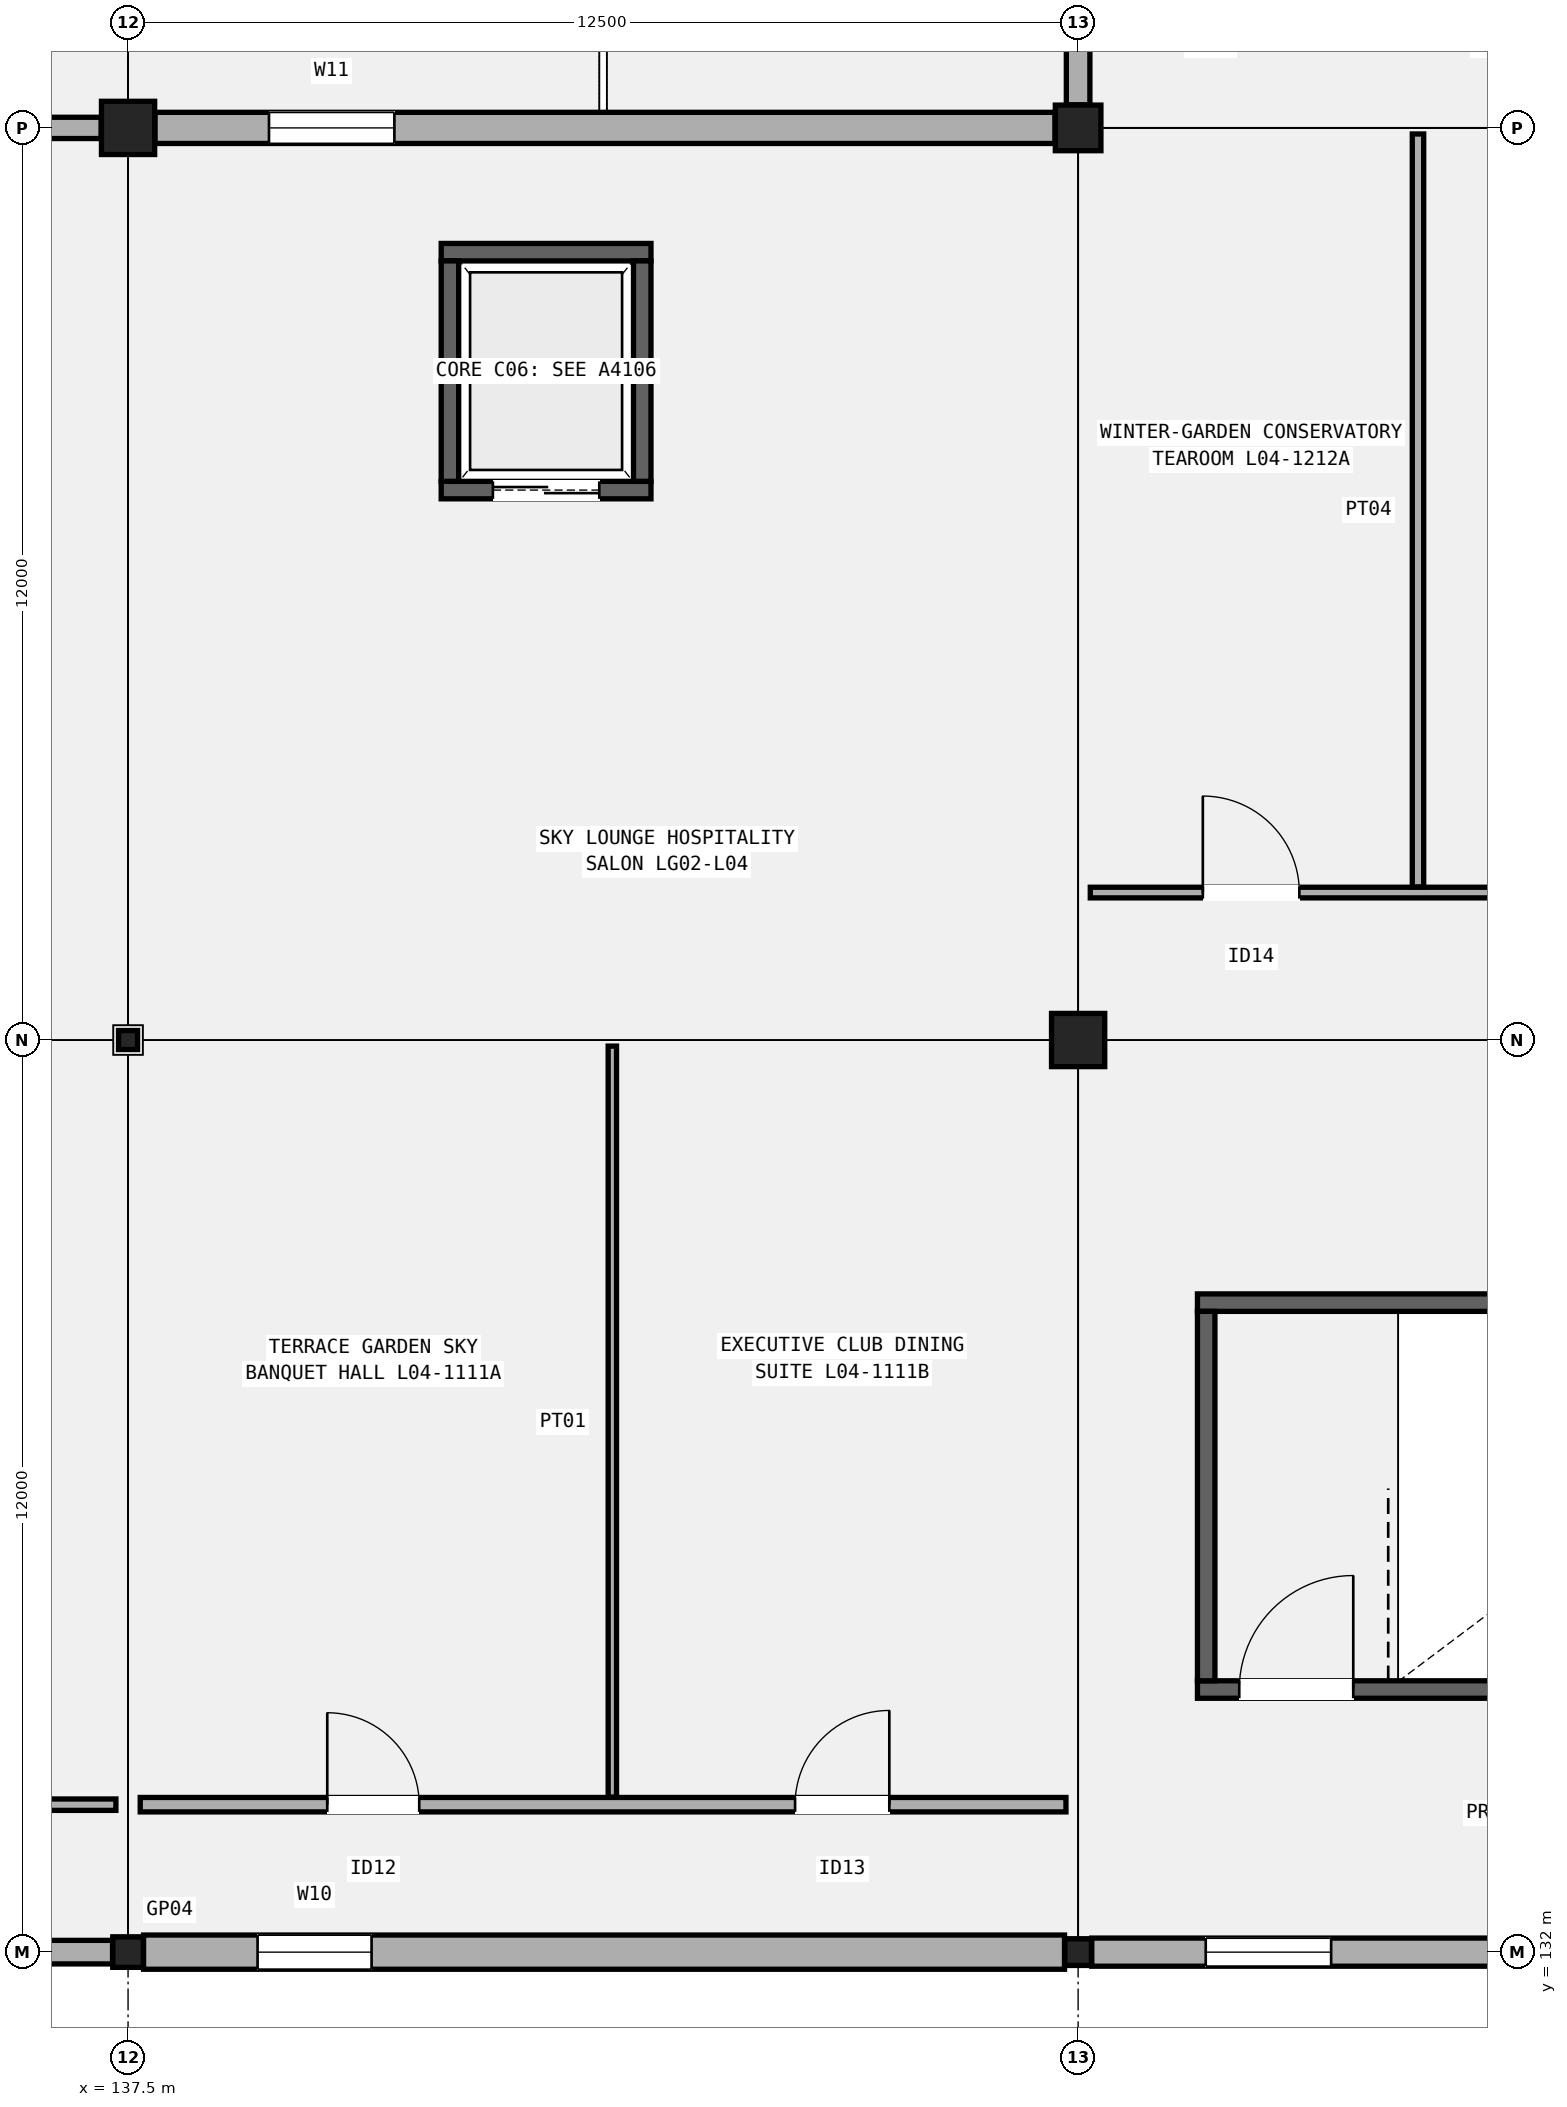
"""IFC4 building model, lengths in metres.
Left out: names, types, materials, properties, quantities, classifications, styles, units other than length and angle.
Written with IfcOpenShell. Run it as: python <this file> out.ifc"""

import sys

from ifc_helpers import new_model, si_unit, direction, frame, frame_2d, origin, origin_2d, place, context, subcontext, project, spatial, rectangle, hollow_rectangle, extrude, element, fill, save


model = new_model("IFC4")
c1 = context("Model", 3, precision=1e-05, world=origin(), true_north=direction((0.0, 1.0)))
c2 = subcontext(c1, "Body", "Model", "MODEL_VIEW")
j1 = project(units=[si_unit("LENGTHUNIT", "METRE"), si_unit("PLANEANGLEUNIT", "RADIAN")], contexts=[c1])
p1 = place(None, origin())
s1 = spatial("IfcSite", under=j1, at=p1, CompositionType="ELEMENT")
p2 = place(p1, origin())
s2 = spatial("IfcBuilding", under=s1, at=p2, CompositionType="ELEMENT")
p3 = place(p2, frame((0.0, 0.0, 20.4)))
s3 = spatial("IfcBuildingStorey", under=s2, at=p3, CompositionType="ELEMENT", Elevation=20.4)
p4 = place(p3, frame((137.5, 132.0, 0.0), z_axis=(0.0, 0.0, 1.0), x_axis=(1.0, 0.0, 0.0)))
e1 = element("IfcColumn", 1, at=p4, inside=s3, PredefinedType="COLUMN", context=c2, shape_type="SweptSolid", body=[
    extrude(hollow_rectangle(XDim=0.4, YDim=0.4, WallThickness=0.016, InnerFilletRadius=0.016, OuterFilletRadius=0.032, at=origin_2d()), origin(), (0.0, 0.0, 1.0), 5.4),
])
p5 = place(p3, frame((137.5, 144.0, 0.0), z_axis=(0.0, 0.0, 1.0), x_axis=(1.0, 0.0, 0.0)))
e2 = element("IfcColumn", 2, at=p5, inside=s3, PredefinedType="COLUMN", context=c2, shape_type="SweptSolid", body=[
    extrude(hollow_rectangle(XDim=0.25, YDim=0.25, WallThickness=0.012, InnerFilletRadius=0.012, OuterFilletRadius=0.024, at=origin_2d()), origin(), (0.0, 0.0, 1.0), 5.4),
])
p6 = place(p3, frame((137.5, 156.0, 0.0), z_axis=(0.0, 0.0, 1.0), x_axis=(1.0, 0.0, 0.0)))
e3 = element("IfcColumn", 3, at=p6, inside=s3, PredefinedType="COLUMN", context=c2, shape_type="SweptSolid", body=[
    extrude(rectangle(XDim=0.7, YDim=0.7, at=origin_2d()), origin(), (0.0, 0.0, 1.0), 5.4),
])
p7 = place(p3, frame((150.0, 132.0, 0.0), z_axis=(0.0, 0.0, 1.0), x_axis=(1.0, 0.0, 0.0)))
e4 = element("IfcColumn", 4, at=p7, inside=s3, PredefinedType="COLUMN", context=c2, shape_type="SweptSolid", body=[
    extrude(hollow_rectangle(XDim=0.35, YDim=0.35, WallThickness=0.016, InnerFilletRadius=0.016, OuterFilletRadius=0.032, at=origin_2d()), origin(), (0.0, 0.0, 1.0), 5.4),
])
p8 = place(p3, frame((150.0, 144.0, 0.0), z_axis=(0.0, 0.0, 1.0), x_axis=(1.0, 0.0, 0.0)))
e5 = element("IfcColumn", 5, at=p8, inside=s3, PredefinedType="COLUMN", context=c2, shape_type="SweptSolid", body=[
    extrude(rectangle(XDim=0.7, YDim=0.7, at=origin_2d()), origin(), (0.0, 0.0, 1.0), 5.4),
])
p9 = place(p3, frame((150.0, 156.0, 0.0), z_axis=(0.0, 0.0, 1.0), x_axis=(1.0, 0.0, 0.0)))
e6 = element("IfcColumn", 6, at=p9, inside=s3, PredefinedType="COLUMN", context=c2, shape_type="SweptSolid", body=[
    extrude(rectangle(XDim=0.6, YDim=0.6, at=origin_2d()), origin(), (0.0, 0.0, 1.0), 5.4),
])
p10 = place(p3, frame((125.179, 132.0, 0.0), z_axis=(0.0, 0.0, 1.0), x_axis=(1.0, 0.0, 0.0)))
e7 = element("IfcWall", 7, at=p10, inside=s3, PredefinedType="SOLIDWALL", context=c2, shape_type="SweptSolid", body=[
    extrude(rectangle(XDim=12.117, YDim=0.31, at=frame_2d((6.059, 0.0))), origin(), (0.0, 0.0, 1.0), 4.48),
])
p11 = place(p10, frame((1.5, 0.0, 0.95)))
e8 = element("IfcOpeningElement", 8, at=p11, cuts=e7, PredefinedType="OPENING", context=c2, shape_type="SweptSolid", body=[
    extrude(rectangle(XDim=1.35, YDim=2.4, at=frame_2d((0.675, 1.2))), frame((0.0, 0.165, 0.0), z_axis=(0.0, -1.0, 0.0), x_axis=(1.0, 0.0, 0.0)), (0.0, 0.0, 1.0), 0.33),
])
p12 = place(p3, frame((125.129, 156.0, 0.0), z_axis=(0.0, 0.0, 1.0), x_axis=(1.0, 0.0, 0.0)))
e9 = element("IfcWall", 9, at=p12, inside=s3, PredefinedType="SOLIDWALL", context=c2, shape_type="SweptSolid", body=[
    extrude(rectangle(XDim=12.017, YDim=0.28, at=frame_2d((6.009, 0.0))), origin(), (0.0, 0.0, 1.0), 4.592),
])
p13 = place(p12, frame((1.5, 0.0, 0.95)))
e10 = element("IfcOpeningElement", 10, at=p13, cuts=e9, PredefinedType="OPENING", context=c2, shape_type="SweptSolid", body=[
    extrude(rectangle(XDim=1.5, YDim=1.8, at=frame_2d((0.75, 0.9))), frame((0.0, 0.15, 0.0), z_axis=(0.0, -1.0, 0.0), x_axis=(1.0, 0.0, 0.0)), (0.0, 0.0, 1.0), 0.3),
])
p14 = place(p3, frame((137.704, 132.0, 0.0), z_axis=(0.0, 0.0, 1.0), x_axis=(1.0, 0.0, 0.0)))
e11 = element("IfcWall", 11, at=p14, inside=s3, PredefinedType="SOLIDWALL", context=c2, shape_type="SweptSolid", body=[
    extrude(rectangle(XDim=12.117, YDim=0.45, at=frame_2d((6.059, 0.0))), origin(), (0.0, 0.0, 1.0), 4.58),
])
p15 = place(p14, frame((1.5, 0.0, 0.95)))
e12 = element("IfcOpeningElement", 12, at=p15, cuts=e11, PredefinedType="OPENING", context=c2, shape_type="SweptSolid", body=[
    extrude(rectangle(XDim=1.5, YDim=2.25, at=frame_2d((0.75, 1.125))), frame((0.0, 0.235, 0.0), z_axis=(0.0, -1.0, 0.0), x_axis=(1.0, 0.0, 0.0)), (0.0, 0.0, 1.0), 0.47),
])
p16 = place(p3, frame((137.854, 156.0, 0.0), z_axis=(0.0, 0.0, 1.0), x_axis=(1.0, 0.0, 0.0)))
e13 = element("IfcWall", 13, at=p16, inside=s3, PredefinedType="SOLIDWALL", context=c2, shape_type="SweptSolid", body=[
    extrude(rectangle(XDim=11.842, YDim=0.41, at=frame_2d((5.921, 0.0))), origin(), (0.0, 0.0, 1.0), 4.48),
])
p17 = place(p16, frame((1.5, 0.0, 0.95)))
e14 = element("IfcOpeningElement", 14, at=p17, cuts=e13, PredefinedType="OPENING", context=c2, shape_type="SweptSolid", body=[
    extrude(rectangle(XDim=1.65, YDim=2.05, at=frame_2d((0.825, 1.025))), frame((0.0, 0.215, 0.0), z_axis=(0.0, -1.0, 0.0), x_axis=(1.0, 0.0, 0.0)), (0.0, 0.0, 1.0), 0.43),
])
p18 = place(p3, frame((150.179, 132.0, 0.0), z_axis=(0.0, 0.0, 1.0), x_axis=(1.0, 0.0, 0.0)))
e15 = element("IfcWall", 15, at=p18, inside=s3, PredefinedType="SOLIDWALL", context=c2, shape_type="SweptSolid", body=[
    extrude(rectangle(XDim=11.967, YDim=0.37, at=frame_2d((5.983, 0.0))), origin(), (0.0, 0.0, 1.0), 4.592),
])
p19 = place(p18, frame((1.5, 0.0, 0.95)))
e16 = element("IfcOpeningElement", 16, at=p19, cuts=e15, PredefinedType="OPENING", context=c2, shape_type="SweptSolid", body=[
    extrude(rectangle(XDim=1.65, YDim=2.45, at=frame_2d((0.825, 1.225))), frame((0.0, 0.195, 0.0), z_axis=(0.0, -1.0, 0.0), x_axis=(1.0, 0.0, 0.0)), (0.0, 0.0, 1.0), 0.39),
])
p20 = place(p3, frame((150.0, 156.304, 0.0), z_axis=(0.0, 0.0, 1.0), x_axis=(0.0, 1.0, 0.0)))
e17 = element("IfcWall", 17, at=p20, inside=s3, PredefinedType="SOLIDWALL", context=c2, shape_type="SweptSolid", body=[
    extrude(rectangle(XDim=11.492, YDim=0.31, at=frame_2d((5.746, 0.0))), origin(), (0.0, 0.0, 1.0), 4.58),
])
p21 = place(p20, frame((2.266, 0.0, 0.95)))
e18 = element("IfcOpeningElement", 18, at=p21, cuts=e17, PredefinedType="OPENING", context=c2, shape_type="SweptSolid", body=[
    extrude(rectangle(XDim=1.8, YDim=2.15, at=frame_2d((0.9, 1.075))), frame((0.0, 0.165, 0.0), z_axis=(0.0, -1.0, 0.0), x_axis=(1.0, 0.0, 0.0)), (0.0, 0.0, 1.0), 0.33),
])
p22 = place(p3, frame((151.57, 135.455, 0.0), z_axis=(0.0, 0.0, 1.0), x_axis=(1.0, 0.0, 0.0)))
e19 = element("IfcWall", 19, at=p22, inside=s3, PredefinedType="SHEAR", context=c2, shape_type="SweptSolid", body=[
    extrude(rectangle(XDim=9.36, YDim=0.23, at=frame_2d((4.68, 0.0))), origin(), (0.0, 0.0, 1.0), 5.18),
])
p23 = place(p22, frame((0.55, 0.0, 0.0)))
e20 = element("IfcOpeningElement", 20, at=p23, cuts=e19, PredefinedType="OPENING", context=c2, shape_type="SweptSolid", body=[
    extrude(rectangle(XDim=1.5, YDim=2.2, at=frame_2d((0.75, 1.1))), frame((0.0, 0.125, 0.0), z_axis=(0.0, -1.0, 0.0), x_axis=(1.0, 0.0, 0.0)), (0.0, 0.0, 1.0), 0.25),
])
p24 = place(p3, frame((151.57, 140.545, 0.0), z_axis=(0.0, 0.0, 1.0), x_axis=(1.0, 0.0, 0.0)))
e21 = element("IfcWall", 21, at=p24, inside=s3, PredefinedType="SHEAR", context=c2, shape_type="SweptSolid", body=[
    extrude(rectangle(XDim=9.36, YDim=0.23, at=frame_2d((4.68, 0.0))), origin(), (0.0, 0.0, 1.0), 5.18),
])
p25 = place(p3, frame((151.685, 135.57, 0.0), z_axis=(0.0, 0.0, 1.0), x_axis=(0.0, 1.0, 0.0)))
e22 = element("IfcWall", 22, at=p25, inside=s3, PredefinedType="SHEAR", context=c2, shape_type="SweptSolid", body=[
    extrude(rectangle(XDim=4.86, YDim=0.23, at=frame_2d((2.43, 0.0))), origin(), (0.0, 0.0, 1.0), 5.18),
])
p26 = place(p3, frame((141.62, 151.235, 0.0), z_axis=(0.0, 0.0, 1.0), x_axis=(1.0, 0.0, 0.0)))
e23 = element("IfcWall", 23, at=p26, inside=s3, PredefinedType="SHEAR", context=c2, shape_type="SweptSolid", body=[
    extrude(rectangle(XDim=2.76, YDim=0.23, at=frame_2d((1.38, 0.0))), origin(), (0.0, 0.0, 1.0), 5.18),
])
p27 = place(p26, frame((0.68, 0.0, 0.0)))
e24 = element("IfcOpeningElement", 24, at=p27, cuts=e23, PredefinedType="OPENING", context=c2, shape_type="SweptSolid", body=[
    extrude(rectangle(XDim=1.4, YDim=2.25, at=frame_2d((0.7, 1.125))), frame((0.0, 0.125, 0.0), z_axis=(0.0, -1.0, 0.0), x_axis=(1.0, 0.0, 0.0)), (0.0, 0.0, 1.0), 0.25),
])
p28 = place(p3, frame((141.62, 154.365, 0.0), z_axis=(0.0, 0.0, 1.0), x_axis=(1.0, 0.0, 0.0)))
e25 = element("IfcWall", 25, at=p28, inside=s3, PredefinedType="SHEAR", context=c2, shape_type="SweptSolid", body=[
    extrude(rectangle(XDim=2.76, YDim=0.23, at=frame_2d((1.38, 0.0))), origin(), (0.0, 0.0, 1.0), 5.18),
])
for number, where, z_axis, x_axis in (
    (26, (141.735, 151.35, 0.0), (0.0, 0.0, 1.0), (0.0, 1.0, 0.0)),
    (27, (144.265, 151.35, 0.0), (0.0, 0.0, 1.0), (0.0, 1.0, 0.0)),
):
    element("IfcWall", number, at=place(p3, frame(where, z_axis=z_axis, x_axis=x_axis)), inside=s3, PredefinedType="SHEAR", context=c2, shape_type="SweptSolid", body=[
        extrude(rectangle(XDim=2.9, YDim=0.23, at=frame_2d((1.45, 0.0))), origin(), (0.0, 0.0, 1.0), 5.18),
    ])
p29 = place(p3, frame((125.16, 133.94, 0.0), z_axis=(0.0, 0.0, 1.0), x_axis=(1.0, 0.0, 0.0)))
e28 = element("IfcWall", 28, at=p29, inside=s3, PredefinedType="PARTITIONING", context=c2, shape_type="SweptSolid", body=[
    extrude(rectangle(XDim=12.18, YDim=0.15, at=frame_2d((6.09, 0.0))), origin(), (0.0, 0.0, 1.0), 4.52),
])
p30 = place(p29, frame((5.5, 0.0, 0.0)))
e29 = element("IfcOpeningElement", 29, at=p30, cuts=e28, PredefinedType="OPENING", context=c2, shape_type="SweptSolid", body=[
    extrude(rectangle(XDim=1.18, YDim=2.2, at=frame_2d((0.59, 1.1))), frame((0.0, 0.085, 0.0), z_axis=(0.0, -1.0, 0.0), x_axis=(1.0, 0.0, 0.0)), (0.0, 0.0, 1.0), 0.17),
])
p31 = place(p3, frame((137.66, 133.94, 0.0), z_axis=(0.0, 0.0, 1.0), x_axis=(1.0, 0.0, 0.0)))
e30 = element("IfcWall", 30, at=p31, inside=s3, PredefinedType="PARTITIONING", context=c2, shape_type="SweptSolid", body=[
    extrude(rectangle(XDim=12.18, YDim=0.19, at=frame_2d((6.09, 0.0))), origin(), (0.0, 0.0, 1.0), 4.52),
])
p32 = place(p31, frame((2.461, 0.0, 0.0)))
e31 = element("IfcOpeningElement", 31, at=p32, cuts=e30, PredefinedType="OPENING", context=c2, shape_type="SweptSolid", body=[
    extrude(rectangle(XDim=1.21, YDim=2.18, at=frame_2d((0.605, 1.09))), frame((0.0, 0.105, 0.0), z_axis=(0.0, -1.0, 0.0), x_axis=(1.0, 0.0, 0.0)), (0.0, 0.0, 1.0), 0.21),
])
p33 = place(p31, frame((8.616, 0.0, 0.0)))
e32 = element("IfcOpeningElement", 32, at=p33, cuts=e30, PredefinedType="OPENING", context=c2, shape_type="SweptSolid", body=[
    extrude(rectangle(XDim=1.24, YDim=2.22, at=frame_2d((0.62, 1.11))), frame((0.0, 0.105, 0.0), z_axis=(0.0, -1.0, 0.0), x_axis=(1.0, 0.0, 0.0)), (0.0, 0.0, 1.0), 0.21),
])
p34 = place(p3, frame((143.872, 134.04, 0.0), z_axis=(0.0, 0.0, 1.0), x_axis=(0.0, 1.0, 0.0)))
e33 = element("IfcWall", 33, at=p34, inside=s3, PredefinedType="PARTITIONING", context=c2, shape_type="SweptSolid", body=[
    extrude(rectangle(XDim=9.88, YDim=0.11, at=frame_2d((4.94, 0.0))), origin(), (0.0, 0.0, 1.0), 4.52),
])
p35 = place(p3, frame((150.16, 145.94, 0.0), z_axis=(0.0, 0.0, 1.0), x_axis=(1.0, 0.0, 0.0)))
e34 = element("IfcWall", 34, at=p35, inside=s3, PredefinedType="PARTITIONING", context=c2, shape_type="SweptSolid", body=[
    extrude(rectangle(XDim=12.18, YDim=0.14, at=frame_2d((6.09, 0.0))), origin(), (0.0, 0.0, 1.0), 4.52),
])
p36 = place(p35, frame((1.481, 0.0, 0.0)))
e35 = element("IfcOpeningElement", 35, at=p36, cuts=e34, PredefinedType="OPENING", context=c2, shape_type="SweptSolid", body=[
    extrude(rectangle(XDim=1.27, YDim=2.2, at=frame_2d((0.635, 1.1))), frame((0.0, 0.08, 0.0), z_axis=(0.0, -1.0, 0.0), x_axis=(1.0, 0.0, 0.0)), (0.0, 0.0, 1.0), 0.16),
])
p37 = place(p35, frame((7.636, 0.0, 0.0)))
e36 = element("IfcOpeningElement", 36, at=p37, cuts=e34, PredefinedType="OPENING", context=c2, shape_type="SweptSolid", body=[
    extrude(rectangle(XDim=1.3, YDim=2.24, at=frame_2d((0.65, 1.12))), frame((0.0, 0.08, 0.0), z_axis=(0.0, -1.0, 0.0), x_axis=(1.0, 0.0, 0.0)), (0.0, 0.0, 1.0), 0.16),
])
p38 = place(p3, frame((154.472, 146.015, 0.0), z_axis=(0.0, 0.0, 1.0), x_axis=(0.0, 1.0, 0.0)))
e37 = element("IfcWall", 37, at=p38, inside=s3, PredefinedType="PARTITIONING", context=c2, shape_type="SweptSolid", body=[
    extrude(rectangle(XDim=9.905, YDim=0.15, at=frame_2d((4.953, 0.0))), origin(), (0.0, 0.0, 1.0), 4.52),
])
p39 = place(p15, origin())
e38 = element("IfcWindow", 38, at=p39, inside=s3, PartitioningType="SINGLE_PANEL", PredefinedType="WINDOW", context=c2, shape_type="SweptSolid", body=[
    extrude(rectangle(XDim=1.5, YDim=2.25, at=frame_2d((0.75, 1.125))), frame((0.0, 0.03, 0.0), z_axis=(0.0, -1.0, 0.0), x_axis=(1.0, 0.0, 0.0)), (0.0, 0.0, 1.0), 0.06),
])
fill(e12, e38)
p40 = place(p17, origin())
e39 = element("IfcWindow", 39, at=p40, inside=s3, PartitioningType="SINGLE_PANEL", PredefinedType="WINDOW", context=c2, shape_type="SweptSolid", body=[
    extrude(rectangle(XDim=1.65, YDim=2.05, at=frame_2d((0.825, 1.025))), frame((0.0, 0.03, 0.0), z_axis=(0.0, -1.0, 0.0), x_axis=(1.0, 0.0, 0.0)), (0.0, 0.0, 1.0), 0.06),
])
fill(e14, e39)
p41 = place(p19, origin())
e40 = element("IfcWindow", 40, at=p41, inside=s3, PartitioningType="SINGLE_PANEL", PredefinedType="WINDOW", context=c2, shape_type="SweptSolid", body=[
    extrude(rectangle(XDim=1.65, YDim=2.45, at=frame_2d((0.825, 1.225))), frame((0.0, 0.03, 0.0), z_axis=(0.0, -1.0, 0.0), x_axis=(1.0, 0.0, 0.0)), (0.0, 0.0, 1.0), 0.06),
])
fill(e16, e40)
p42 = place(p23, origin())
e41 = element("IfcDoor", 41, at=p42, inside=s3, OperationType="SINGLE_SWING_RIGHT", PredefinedType="DOOR", context=c2, shape_type="SweptSolid", body=[
    extrude(rectangle(XDim=1.5, YDim=2.2, at=frame_2d((0.75, 1.1))), frame((0.0, 0.025, 0.0), z_axis=(0.0, -1.0, 0.0), x_axis=(1.0, 0.0, 0.0)), (0.0, 0.0, 1.0), 0.05),
])
fill(e20, e41)
p43 = place(p27, origin())
e42 = element("IfcDoor", 42, at=p43, inside=s3, OperationType="DOUBLE_DOOR_SLIDING", PredefinedType="DOOR", context=c2, shape_type="SweptSolid", body=[
    extrude(rectangle(XDim=1.4, YDim=2.25, at=frame_2d((0.7, 1.125))), frame((0.0, 0.025, 0.0), z_axis=(0.0, -1.0, 0.0), x_axis=(1.0, 0.0, 0.0)), (0.0, 0.0, 1.0), 0.05),
])
fill(e24, e42)
p44 = place(p32, origin())
e43 = element("IfcDoor", 43, at=p44, inside=s3, OperationType="SINGLE_SWING_LEFT", PredefinedType="DOOR", context=c2, shape_type="SweptSolid", body=[
    extrude(rectangle(XDim=1.21, YDim=2.18, at=frame_2d((0.605, 1.09))), frame((0.0, 0.025, 0.0), z_axis=(0.0, -1.0, 0.0), x_axis=(1.0, 0.0, 0.0)), (0.0, 0.0, 1.0), 0.05),
])
fill(e31, e43)
p45 = place(p33, origin())
e44 = element("IfcDoor", 44, at=p45, inside=s3, OperationType="SINGLE_SWING_RIGHT", PredefinedType="DOOR", context=c2, shape_type="SweptSolid", body=[
    extrude(rectangle(XDim=1.24, YDim=2.22, at=frame_2d((0.62, 1.11))), frame((0.0, 0.025, 0.0), z_axis=(0.0, -1.0, 0.0), x_axis=(1.0, 0.0, 0.0)), (0.0, 0.0, 1.0), 0.05),
])
fill(e32, e44)
p46 = place(p36, origin())
e45 = element("IfcDoor", 45, at=p46, inside=s3, OperationType="SINGLE_SWING_LEFT", PredefinedType="DOOR", context=c2, shape_type="SweptSolid", body=[
    extrude(rectangle(XDim=1.27, YDim=2.2, at=frame_2d((0.635, 1.1))), frame((0.0, 0.025, 0.0), z_axis=(0.0, -1.0, 0.0), x_axis=(1.0, 0.0, 0.0)), (0.0, 0.0, 1.0), 0.05),
])
fill(e35, e45)
save(model, sys.argv[1])
